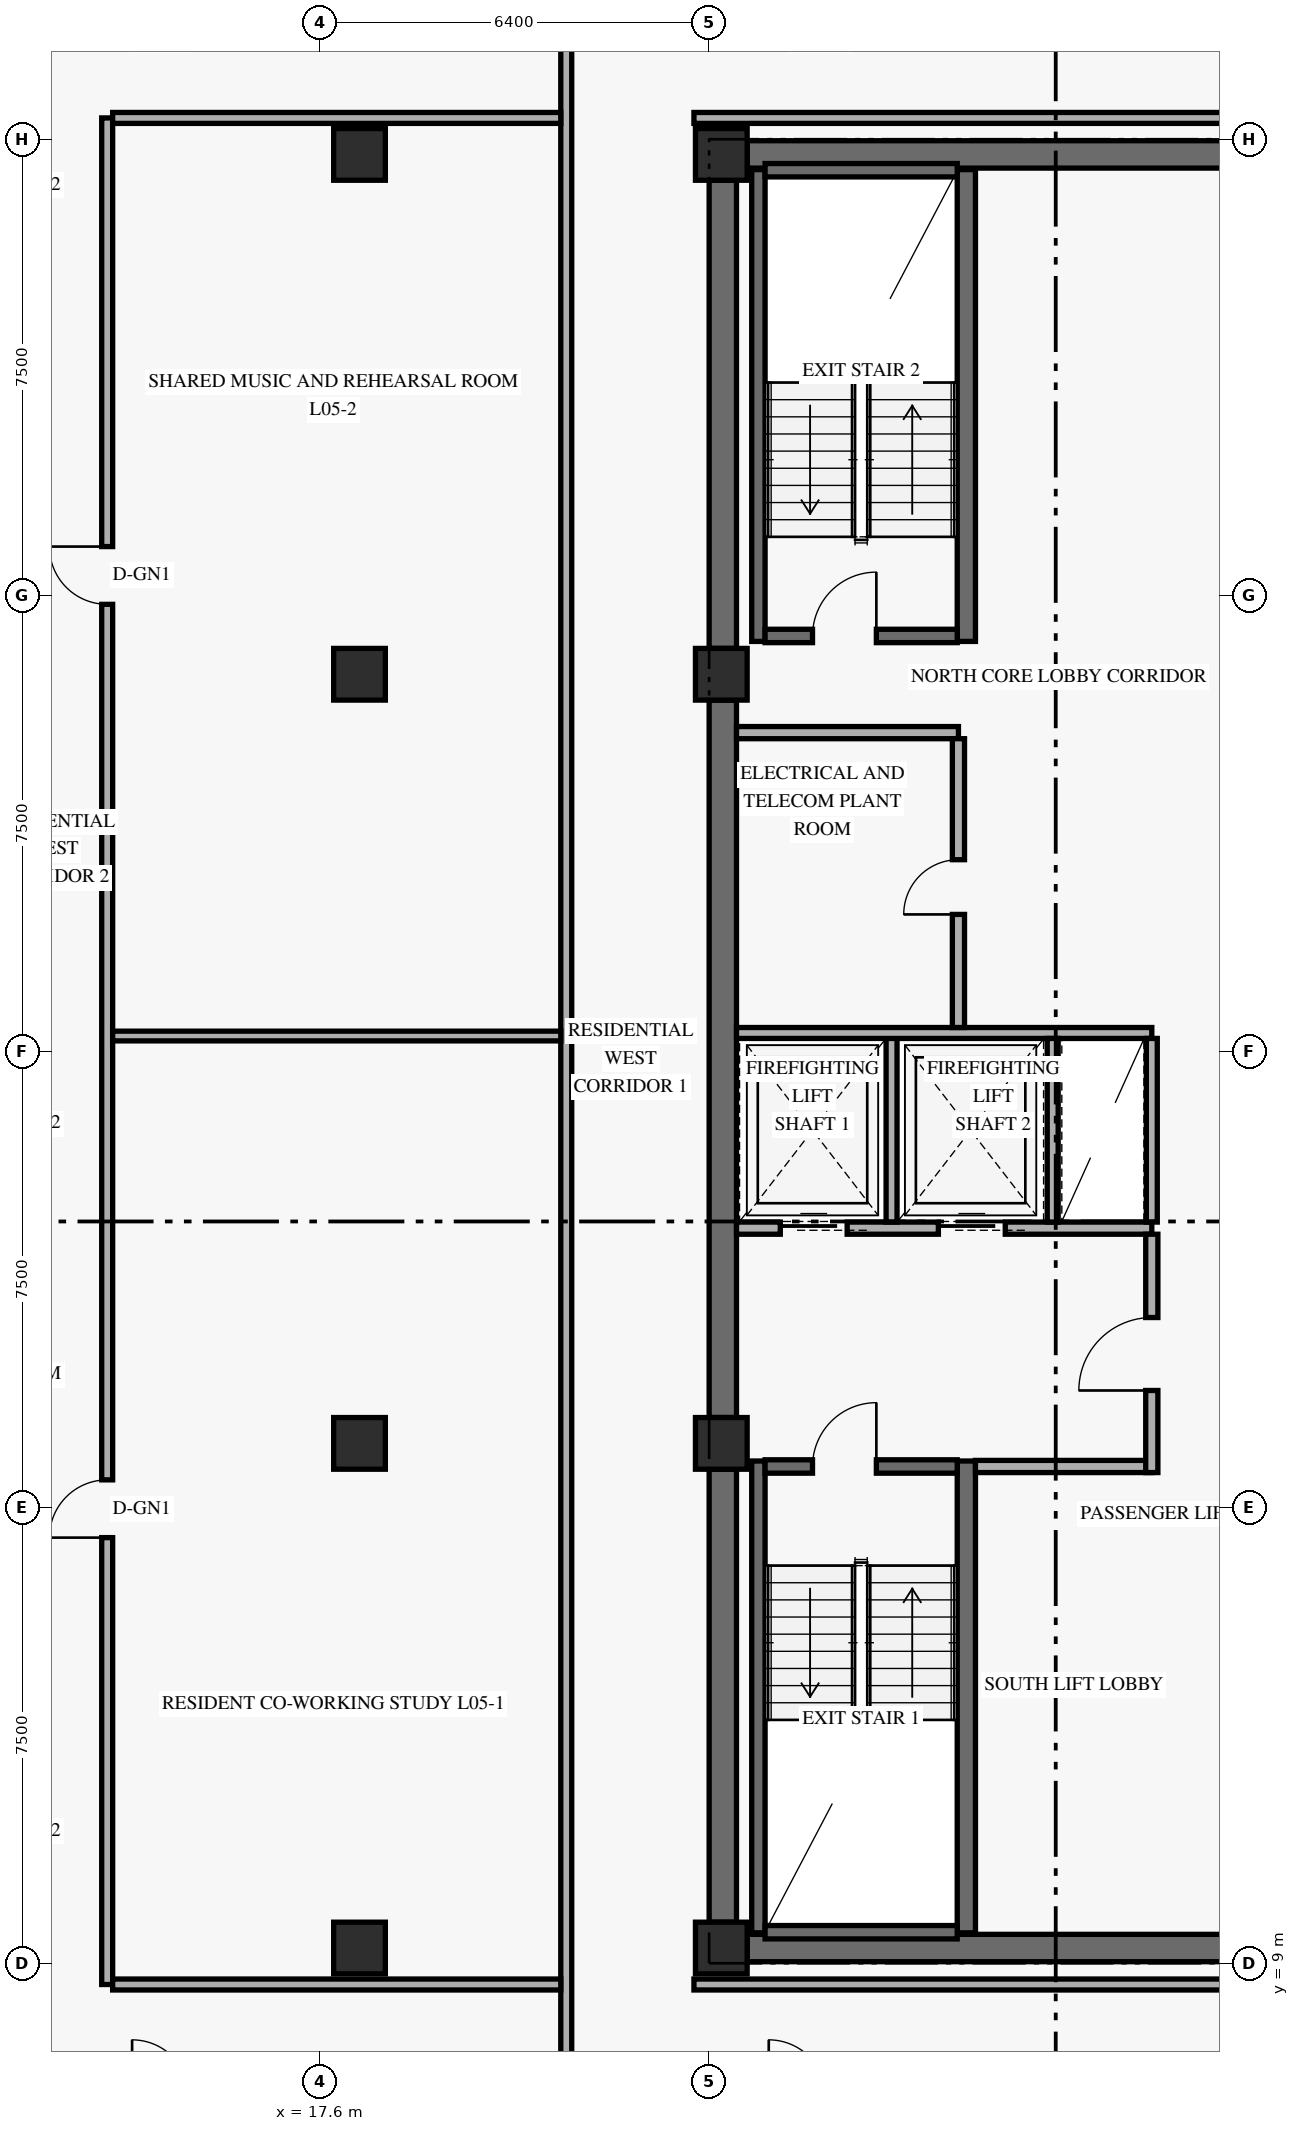
"""IFC4 building model, lengths in metres.
Left out: names, types, materials, properties, quantities, classifications, styles, units other than length and angle.
Written with IfcOpenShell. Run it as: python <this file> out.ifc"""

import sys

from ifc_helpers import new_model, si_unit, direction, frame, frame_2d, origin, origin_2d, place, context, subcontext, project, spatial, rectangle, extrude, element, fill, save


model = new_model("IFC4")
c1 = context("Model", 3, precision=1e-05, world=origin(), true_north=direction((0.0, 1.0)))
c2 = subcontext(c1, "Body", "Model", "MODEL_VIEW")
j1 = project(units=[si_unit("LENGTHUNIT", "METRE"), si_unit("PLANEANGLEUNIT", "RADIAN")], contexts=[c1])
p1 = place(None, origin())
s1 = spatial("IfcSite", under=j1, at=p1, CompositionType="ELEMENT")
p2 = place(p1, origin())
s2 = spatial("IfcBuilding", under=s1, at=p2, CompositionType="ELEMENT")
p3 = place(p2, frame((0.0, 0.0, 24.0)))
s3 = spatial("IfcBuildingStorey", under=s2, at=p3, CompositionType="ELEMENT", Elevation=24.0)
p4 = place(p3, frame((24.225, 9.675, 0.0), z_axis=(0.0, 0.0, 1.0), x_axis=(0.0, 1.0, 0.0)))
e1 = element("IfcWall", 1, at=p4, inside=s3, PredefinedType="SHEAR", context=c2, shape_type="SweptSolid", body=[
    extrude(rectangle(XDim=7.45, YDim=0.45, at=frame_2d((3.725, 0.0))), origin(), (0.0, 0.0, 1.0), 2.667),
])
p5 = place(p3, frame((24.225, 17.975, 0.0), z_axis=(0.0, 0.0, 1.0), x_axis=(0.0, 1.0, 0.0)))
e2 = element("IfcWall", 2, at=p5, inside=s3, PredefinedType="SHEAR", context=c2, shape_type="SweptSolid", body=[
    extrude(rectangle(XDim=11.8, YDim=0.45, at=frame_2d((5.9, 0.0))), origin(), (0.0, 0.0, 1.0), 2.667),
])
p6 = place(p3, frame((24.225, 30.625, 0.0), z_axis=(0.0, 0.0, 1.0), x_axis=(0.0, 1.0, 0.0)))
e3 = element("IfcWall", 3, at=p6, inside=s3, PredefinedType="SHEAR", context=c2, shape_type="SweptSolid", body=[
    extrude(rectangle(XDim=7.7, YDim=0.45, at=frame_2d((3.85, 0.0))), origin(), (0.0, 0.0, 1.0), 2.667),
])
for number, where, z_axis, x_axis in (
    (4, (24.625, 9.25, 0.0), (0.0, 0.0, 1.0), (1.0, 0.0, 0.0)),
    (5, (24.625, 38.75, 0.0), (0.0, 0.0, 1.0), (1.0, 0.0, 0.0)),
):
    element("IfcWall", number, at=place(p3, frame(where, z_axis=z_axis, x_axis=x_axis)), inside=s3, PredefinedType="SHEAR", context=c2, shape_type="SweptSolid", body=[
        extrude(rectangle(XDim=10.15, YDim=0.45, at=frame_2d((5.075, 0.0))), origin(), (0.0, 0.0, 1.0), 3.36),
    ])
p7 = place(p3, frame((24.81, 9.5, 0.0), z_axis=(0.0, 0.0, 1.0), x_axis=(0.0, 1.0, 0.0)))
e6 = element("IfcWall", 6, at=p7, inside=s3, PredefinedType="SHEAR", context=c2, shape_type="SweptSolid", body=[
    extrude(rectangle(XDim=7.76, YDim=0.22, at=frame_2d((3.88, 0.0))), origin(), (0.0, 0.0, 1.0), 3.36),
])
p8 = place(p3, frame((28.23, 9.5, 0.0), z_axis=(0.0, 0.0, 1.0), x_axis=(0.0, 1.0, 0.0)))
e7 = element("IfcWall", 7, at=p8, inside=s3, PredefinedType="SHEAR", context=c2, shape_type="SweptSolid", body=[
    extrude(rectangle(XDim=7.76, YDim=0.3, at=frame_2d((3.88, 0.0))), origin(), (0.0, 0.0, 1.0), 3.36),
])
p9 = place(p3, frame((24.92, 9.51, 0.0), z_axis=(0.0, 0.0, 1.0), x_axis=(1.0, 0.0, 0.0)))
e8 = element("IfcWall", 8, at=p9, inside=s3, PredefinedType="SHEAR", context=c2, shape_type="SweptSolid", body=[
    extrude(rectangle(XDim=3.16, YDim=0.22, at=frame_2d((1.58, 0.0))), origin(), (0.0, 0.0, 1.0), 3.36),
])
p10 = place(p3, frame((24.92, 17.17, 0.0), z_axis=(0.0, 0.0, 1.0), x_axis=(1.0, 0.0, 0.0)))
e9 = element("IfcWall", 9, at=p10, inside=s3, PredefinedType="SHEAR", context=c2, shape_type="SweptSolid", body=[
    extrude(rectangle(XDim=3.16, YDim=0.22, at=frame_2d((1.58, 0.0))), origin(), (0.0, 0.0, 1.0), 3.36),
])
p11 = place(p10, frame((0.78, 0.0, 0.0)))
e10 = element("IfcOpeningElement", 10, at=p11, cuts=e9, PredefinedType="OPENING", context=c2, shape_type="SweptSolid", body=[
    extrude(rectangle(XDim=1.05, YDim=2.15, at=frame_2d((0.525, 1.075))), frame((0.0, 0.12, 0.0), z_axis=(0.0, -1.0, 0.0), x_axis=(1.0, 0.0, 0.0)), (0.0, 0.0, 1.0), 0.24),
])
p12 = place(p3, frame((24.81, 30.74, 0.0), z_axis=(0.0, 0.0, 1.0), x_axis=(0.0, 1.0, 0.0)))
e11 = element("IfcWall", 11, at=p12, inside=s3, PredefinedType="SHEAR", context=c2, shape_type="SweptSolid", body=[
    extrude(rectangle(XDim=7.76, YDim=0.22, at=frame_2d((3.88, 0.0))), origin(), (0.0, 0.0, 1.0), 3.36),
])
p13 = place(p3, frame((28.23, 30.74, 0.0), z_axis=(0.0, 0.0, 1.0), x_axis=(0.0, 1.0, 0.0)))
e12 = element("IfcWall", 12, at=p13, inside=s3, PredefinedType="SHEAR", context=c2, shape_type="SweptSolid", body=[
    extrude(rectangle(XDim=7.76, YDim=0.3, at=frame_2d((3.88, 0.0))), origin(), (0.0, 0.0, 1.0), 3.36),
])
p14 = place(p3, frame((24.92, 30.83, 0.0), z_axis=(0.0, 0.0, 1.0), x_axis=(1.0, 0.0, 0.0)))
e13 = element("IfcWall", 13, at=p14, inside=s3, PredefinedType="SHEAR", context=c2, shape_type="SweptSolid", body=[
    extrude(rectangle(XDim=3.16, YDim=0.22, at=frame_2d((1.58, 0.0))), origin(), (0.0, 0.0, 1.0), 3.36),
])
p15 = place(p14, frame((0.78, 0.0, 0.0)))
e14 = element("IfcOpeningElement", 14, at=p15, cuts=e13, PredefinedType="OPENING", context=c2, shape_type="SweptSolid", body=[
    extrude(rectangle(XDim=1.05, YDim=2.15, at=frame_2d((0.525, 1.075))), frame((0.0, 0.12, 0.0), z_axis=(0.0, -1.0, 0.0), x_axis=(1.0, 0.0, 0.0)), (0.0, 0.0, 1.0), 0.24),
])
p16 = place(p3, frame((24.92, 38.49, 0.0), z_axis=(0.0, 0.0, 1.0), x_axis=(1.0, 0.0, 0.0)))
e15 = element("IfcWall", 15, at=p16, inside=s3, PredefinedType="SHEAR", context=c2, shape_type="SweptSolid", body=[
    extrude(rectangle(XDim=3.16, YDim=0.22, at=frame_2d((1.58, 0.0))), origin(), (0.0, 0.0, 1.0), 3.36),
])
for number, where, z_axis, x_axis in (
    (16, (18.25, 9.25, 0.0), (0.0, 0.0, 1.0), (1.0, 0.0, 0.0)),
    (17, (18.25, 17.55, 0.0), (0.0, 0.0, 1.0), (1.0, 0.0, 0.0)),
    (18, (18.25, 30.2, 0.0), (0.0, 0.0, 1.0), (1.0, 0.0, 0.0)),
    (19, (18.25, 38.75, 0.0), (0.0, 0.0, 1.0), (1.0, 0.0, 0.0)),
    (20, (24.2, 9.25, 0.0), (0.0, 0.0, 1.0), (1.0, 0.0, 0.0)),
    (21, (24.2, 17.55, 0.0), (0.0, 0.0, 1.0), (1.0, 0.0, 0.0)),
    (22, (24.2, 30.2, 0.0), (0.0, 0.0, 1.0), (1.0, 0.0, 0.0)),
    (23, (24.2, 38.75, 0.0), (0.0, 0.0, 1.0), (1.0, 0.0, 0.0)),
):
    element("IfcColumn", number, at=place(p3, frame(where, z_axis=z_axis, x_axis=x_axis)), inside=s3, PredefinedType="COLUMN", context=c2, shape_type="SweptSolid", body=[
        extrude(rectangle(XDim=0.85, YDim=0.85, at=origin_2d()), origin(), (0.0, 0.0, 1.0), 3.6),
    ])
p17 = place(p3, frame((24.45, 21.09, 0.0), z_axis=(0.0, 0.0, 1.0), x_axis=(1.0, 0.0, 0.0)))
e24 = element("IfcWall", 24, at=p17, inside=s3, PredefinedType="STANDARD", context=c2, shape_type="SweptSolid", body=[
    extrude(rectangle(XDim=6.83, YDim=0.2, at=frame_2d((3.415, 0.0))), origin(), (0.0, 0.0, 1.0), 3.36),
])
p18 = place(p17, frame((0.72, 0.0, 0.0)))
e25 = element("IfcOpeningElement", 25, at=p18, cuts=e24, PredefinedType="OPENING", context=c2, shape_type="SweptSolid", body=[
    extrude(rectangle(XDim=1.1, YDim=2.2, at=frame_2d((0.55, 1.1))), frame((0.0, 0.11, 0.0), z_axis=(0.0, -1.0, 0.0), x_axis=(1.0, 0.0, 0.0)), (0.0, 0.0, 1.0), 0.22),
])
p19 = place(p17, frame((3.32, 0.0, 0.0)))
e26 = element("IfcOpeningElement", 26, at=p19, cuts=e24, PredefinedType="OPENING", context=c2, shape_type="SweptSolid", body=[
    extrude(rectangle(XDim=1.1, YDim=2.2, at=frame_2d((0.55, 1.1))), frame((0.0, 0.11, 0.0), z_axis=(0.0, -1.0, 0.0), x_axis=(1.0, 0.0, 0.0)), (0.0, 0.0, 1.0), 0.22),
])
p20 = place(p3, frame((28.38, 17.17, 0.0), z_axis=(0.0, 0.0, 1.0), x_axis=(1.0, 0.0, 0.0)))
e27 = element("IfcWall", 27, at=p20, inside=s3, PredefinedType="STANDARD", context=c2, shape_type="SweptSolid", body=[
    extrude(rectangle(XDim=2.9, YDim=0.2, at=frame_2d((1.45, 0.0))), origin(), (0.0, 0.0, 1.0), 3.36),
])
p21 = place(p3, frame((31.28, 17.07, 0.0), z_axis=(0.0, 0.0, 1.0), x_axis=(0.0, 1.0, 0.0)))
e28 = element("IfcWall", 28, at=p21, inside=s3, PredefinedType="STANDARD", context=c2, shape_type="SweptSolid", body=[
    extrude(rectangle(XDim=3.92, YDim=0.2, at=frame_2d((1.96, 0.0))), origin(), (0.0, 0.0, 1.0), 2.649),
])
p22 = place(p21, frame((1.35, 0.0, 0.0)))
e29 = element("IfcOpeningElement", 29, at=p22, cuts=e28, PredefinedType="OPENING", context=c2, shape_type="SweptSolid", body=[
    extrude(rectangle(XDim=1.2, YDim=2.15, at=frame_2d((0.6, 1.075))), frame((0.0, 0.11, 0.0), z_axis=(0.0, -1.0, 0.0), x_axis=(1.0, 0.0, 0.0)), (0.0, 0.0, 1.0), 0.22),
])
p23 = place(p3, frame((27.0, 21.19, 0.0), z_axis=(0.0, 0.0, 1.0), x_axis=(0.0, 1.0, 0.0)))
e30 = element("IfcWall", 30, at=p23, inside=s3, PredefinedType="STANDARD", context=c2, shape_type="SweptSolid", body=[
    extrude(rectangle(XDim=3.11, YDim=0.18, at=frame_2d((1.555, 0.0))), origin(), (0.0, 0.0, 1.0), 3.36),
])
p24 = place(p3, frame((24.45, 24.3, 0.0), z_axis=(0.0, 0.0, 1.0), x_axis=(1.0, 0.0, 0.0)))
e31 = element("IfcWall", 31, at=p24, inside=s3, PredefinedType="STANDARD", context=c2, shape_type="SweptSolid", body=[
    extrude(rectangle(XDim=6.83, YDim=0.18, at=frame_2d((3.415, 0.0))), origin(), (0.0, 0.0, 1.0), 3.36),
])
for number, where, z_axis, x_axis in (
    (32, (29.65, 21.19, 0.0), (0.0, 0.0, 1.0), (0.0, 1.0, 0.0)),
    (33, (31.28, 21.19, 0.0), (0.0, 0.0, 1.0), (0.0, 1.0, 0.0)),
):
    element("IfcWall", number, at=place(p3, frame(where, z_axis=z_axis, x_axis=x_axis)), inside=s3, PredefinedType="STANDARD", context=c2, shape_type="SweptSolid", body=[
        extrude(rectangle(XDim=3.02, YDim=0.18, at=frame_2d((1.51, 0.0))), origin(), (0.0, 0.0, 1.0), 3.36),
    ])
p25 = place(p3, frame((24.45, 29.24, 0.0), z_axis=(0.0, 0.0, 1.0), x_axis=(1.0, 0.0, 0.0)))
e34 = element("IfcWall", 34, at=p25, inside=s3, PredefinedType="STANDARD", context=c2, shape_type="SweptSolid", body=[
    extrude(rectangle(XDim=3.65, YDim=0.2, at=frame_2d((1.825, 0.0))), origin(), (0.0, 0.0, 1.0), 3.36),
])
p26 = place(p3, frame((28.1, 24.39, 0.0), z_axis=(0.0, 0.0, 1.0), x_axis=(0.0, 1.0, 0.0)))
e35 = element("IfcWall", 35, at=p26, inside=s3, PredefinedType="STANDARD", context=c2, shape_type="SweptSolid", body=[
    extrude(rectangle(XDim=4.75, YDim=0.2, at=frame_2d((2.375, 0.0))), origin(), (0.0, 0.0, 1.0), 3.36),
])
p27 = place(p26, frame((1.86, 0.0, 0.0)))
e36 = element("IfcOpeningElement", 36, at=p27, cuts=e35, PredefinedType="OPENING", context=c2, shape_type="SweptSolid", body=[
    extrude(rectangle(XDim=0.9, YDim=2.1, at=frame_2d((0.45, 1.05))), frame((0.0, 0.11, 0.0), z_axis=(0.0, -1.0, 0.0), x_axis=(1.0, 0.0, 0.0)), (0.0, 0.0, 1.0), 0.22),
])
p28 = place(p3, frame((21.65, 6.8, 0.0), z_axis=(0.0, 0.0, 1.0), x_axis=(0.0, 1.0, 0.0)))
e37 = element("IfcWall", 37, at=p28, inside=s3, PredefinedType="STANDARD", context=c2, shape_type="SweptSolid", body=[
    extrude(rectangle(XDim=34.4, YDim=0.18, at=frame_2d((17.2, 0.0))), origin(), (0.0, 0.0, 1.0), 2.649),
])
for number, where, z_axis, x_axis in (
    (38, (23.75, 8.65, 0.0), (0.0, 0.0, 1.0), (1.0, 0.0, 0.0)),
    (39, (23.75, 39.35, 0.0), (0.0, 0.0, 1.0), (1.0, 0.0, 0.0)),
):
    element("IfcWall", number, at=place(p3, frame(where, z_axis=z_axis, x_axis=x_axis)), inside=s3, PredefinedType="STANDARD", context=c2, shape_type="SweptSolid", body=[
        extrude(rectangle(XDim=11.67, YDim=0.18, at=frame_2d((5.835, 0.0))), origin(), (0.0, 0.0, 1.0), 2.649),
    ])
p29 = place(p3, frame((14.1, 8.65, 0.0), z_axis=(0.0, 0.0, 1.0), x_axis=(0.0, 1.0, 0.0)))
e40 = element("IfcWall", 40, at=p29, inside=s3, PredefinedType="STANDARD", context=c2, shape_type="SweptSolid", body=[
    extrude(rectangle(XDim=30.7, YDim=0.18, at=frame_2d((15.35, 0.0))), origin(), (0.0, 0.0, 1.0), 2.649),
])
p30 = place(p29, frame((7.35, 0.0, 0.0)))
e41 = element("IfcOpeningElement", 41, at=p30, cuts=e40, PredefinedType="OPENING", context=c2, shape_type="SweptSolid", body=[
    extrude(rectangle(XDim=0.95, YDim=2.15, at=frame_2d((0.475, 1.075))), frame((0.0, 0.1, 0.0), z_axis=(0.0, -1.0, 0.0), x_axis=(1.0, 0.0, 0.0)), (0.0, 0.0, 1.0), 0.2),
])
p31 = place(p29, frame((22.7, 0.0, 0.0)))
e42 = element("IfcOpeningElement", 42, at=p31, cuts=e40, PredefinedType="OPENING", context=c2, shape_type="SweptSolid", body=[
    extrude(rectangle(XDim=0.95, YDim=2.15, at=frame_2d((0.475, 1.075))), frame((0.0, 0.1, 0.0), z_axis=(0.0, -1.0, 0.0), x_axis=(1.0, 0.0, 0.0)), (0.0, 0.0, 1.0), 0.2),
])
for number, where, z_axis, x_axis in (
    (43, (14.19, 8.65, 0.0), (0.0, 0.0, 1.0), (1.0, 0.0, 0.0)),
    (44, (14.19, 39.35, 0.0), (0.0, 0.0, 1.0), (1.0, 0.0, 0.0)),
):
    element("IfcWall", number, at=place(p3, frame(where, z_axis=z_axis, x_axis=x_axis)), inside=s3, PredefinedType="STANDARD", context=c2, shape_type="SweptSolid", body=[
        extrude(rectangle(XDim=7.37, YDim=0.18, at=frame_2d((3.685, 0.0))), origin(), (0.0, 0.0, 1.0), 2.649),
    ])
p32 = place(p3, frame((14.19, 24.25, 0.0), z_axis=(0.0, 0.0, 1.0), x_axis=(1.0, 0.0, 0.0)))
e45 = element("IfcWall", 45, at=p32, inside=s3, PredefinedType="PARTITIONING", context=c2, shape_type="SweptSolid", body=[
    extrude(rectangle(XDim=7.37, YDim=0.16, at=frame_2d((3.685, 0.0))), origin(), (0.0, 0.0, 1.0), 2.649),
])
p33 = place(p11, frame((1.05, 0.0, 0.0), z_axis=(0.0, 0.0, 1.0), x_axis=(-1.0, 0.0, 0.0)))
e46 = element("IfcDoor", 46, at=p33, inside=s3, OperationType="SINGLE_SWING_LEFT", PredefinedType="DOOR", context=c2, shape_type="SweptSolid", body=[
    extrude(rectangle(XDim=1.05, YDim=2.15, at=frame_2d((0.525, 1.075))), frame((0.0, 0.025, 0.0), z_axis=(0.0, -1.0, 0.0), x_axis=(1.0, 0.0, 0.0)), (0.0, 0.0, 1.0), 0.05),
])
fill(e10, e46)
p34 = place(p15, origin())
e47 = element("IfcDoor", 47, at=p34, inside=s3, OperationType="SINGLE_SWING_RIGHT", PredefinedType="DOOR", context=c2, shape_type="SweptSolid", body=[
    extrude(rectangle(XDim=1.05, YDim=2.15, at=frame_2d((0.525, 1.075))), frame((0.0, 0.025, 0.0), z_axis=(0.0, -1.0, 0.0), x_axis=(1.0, 0.0, 0.0)), (0.0, 0.0, 1.0), 0.05),
])
fill(e14, e47)
p35 = place(p18, origin())
e48 = element("IfcDoor", 48, at=p35, inside=s3, OperationType="SLIDING_TO_LEFT", PredefinedType="DOOR", context=c2, shape_type="SweptSolid", body=[
    extrude(rectangle(XDim=1.1, YDim=2.2, at=frame_2d((0.55, 1.1))), frame((0.0, 0.025, 0.0), z_axis=(0.0, -1.0, 0.0), x_axis=(1.0, 0.0, 0.0)), (0.0, 0.0, 1.0), 0.05),
])
fill(e25, e48)
p36 = place(p19, origin())
e49 = element("IfcDoor", 49, at=p36, inside=s3, OperationType="SLIDING_TO_LEFT", PredefinedType="DOOR", context=c2, shape_type="SweptSolid", body=[
    extrude(rectangle(XDim=1.1, YDim=2.2, at=frame_2d((0.55, 1.1))), frame((0.0, 0.025, 0.0), z_axis=(0.0, -1.0, 0.0), x_axis=(1.0, 0.0, 0.0)), (0.0, 0.0, 1.0), 0.05),
])
fill(e26, e49)
p37 = place(p22, origin())
e50 = element("IfcDoor", 50, at=p37, inside=s3, OperationType="SINGLE_SWING_LEFT", PredefinedType="DOOR", context=c2, shape_type="SweptSolid", body=[
    extrude(rectangle(XDim=1.2, YDim=2.15, at=frame_2d((0.6, 1.075))), frame((0.0, 0.025, 0.0), z_axis=(0.0, -1.0, 0.0), x_axis=(1.0, 0.0, 0.0)), (0.0, 0.0, 1.0), 0.05),
])
fill(e29, e50)
p38 = place(p27, origin())
e51 = element("IfcDoor", 51, at=p38, inside=s3, OperationType="SINGLE_SWING_LEFT", PredefinedType="DOOR", context=c2, shape_type="SweptSolid", body=[
    extrude(rectangle(XDim=0.9, YDim=2.1, at=frame_2d((0.45, 1.05))), frame((0.0, 0.025, 0.0), z_axis=(0.0, -1.0, 0.0), x_axis=(1.0, 0.0, 0.0)), (0.0, 0.0, 1.0), 0.05),
])
fill(e36, e51)
p39 = place(p30, origin())
e52 = element("IfcDoor", 52, at=p39, inside=s3, OperationType="SINGLE_SWING_LEFT", PredefinedType="DOOR", context=c2, shape_type="SweptSolid", body=[
    extrude(rectangle(XDim=0.95, YDim=2.15, at=frame_2d((0.475, 1.075))), frame((0.0, 0.025, 0.0), z_axis=(0.0, -1.0, 0.0), x_axis=(1.0, 0.0, 0.0)), (0.0, 0.0, 1.0), 0.05),
])
fill(e41, e52)
p40 = place(p31, origin())
e53 = element("IfcDoor", 53, at=p40, inside=s3, OperationType="SINGLE_SWING_RIGHT", PredefinedType="DOOR", context=c2, shape_type="SweptSolid", body=[
    extrude(rectangle(XDim=0.95, YDim=2.15, at=frame_2d((0.475, 1.075))), frame((0.0, 0.025, 0.0), z_axis=(0.0, -1.0, 0.0), x_axis=(1.0, 0.0, 0.0)), (0.0, 0.0, 1.0), 0.05),
])
fill(e42, e53)
save(model, sys.argv[1])
